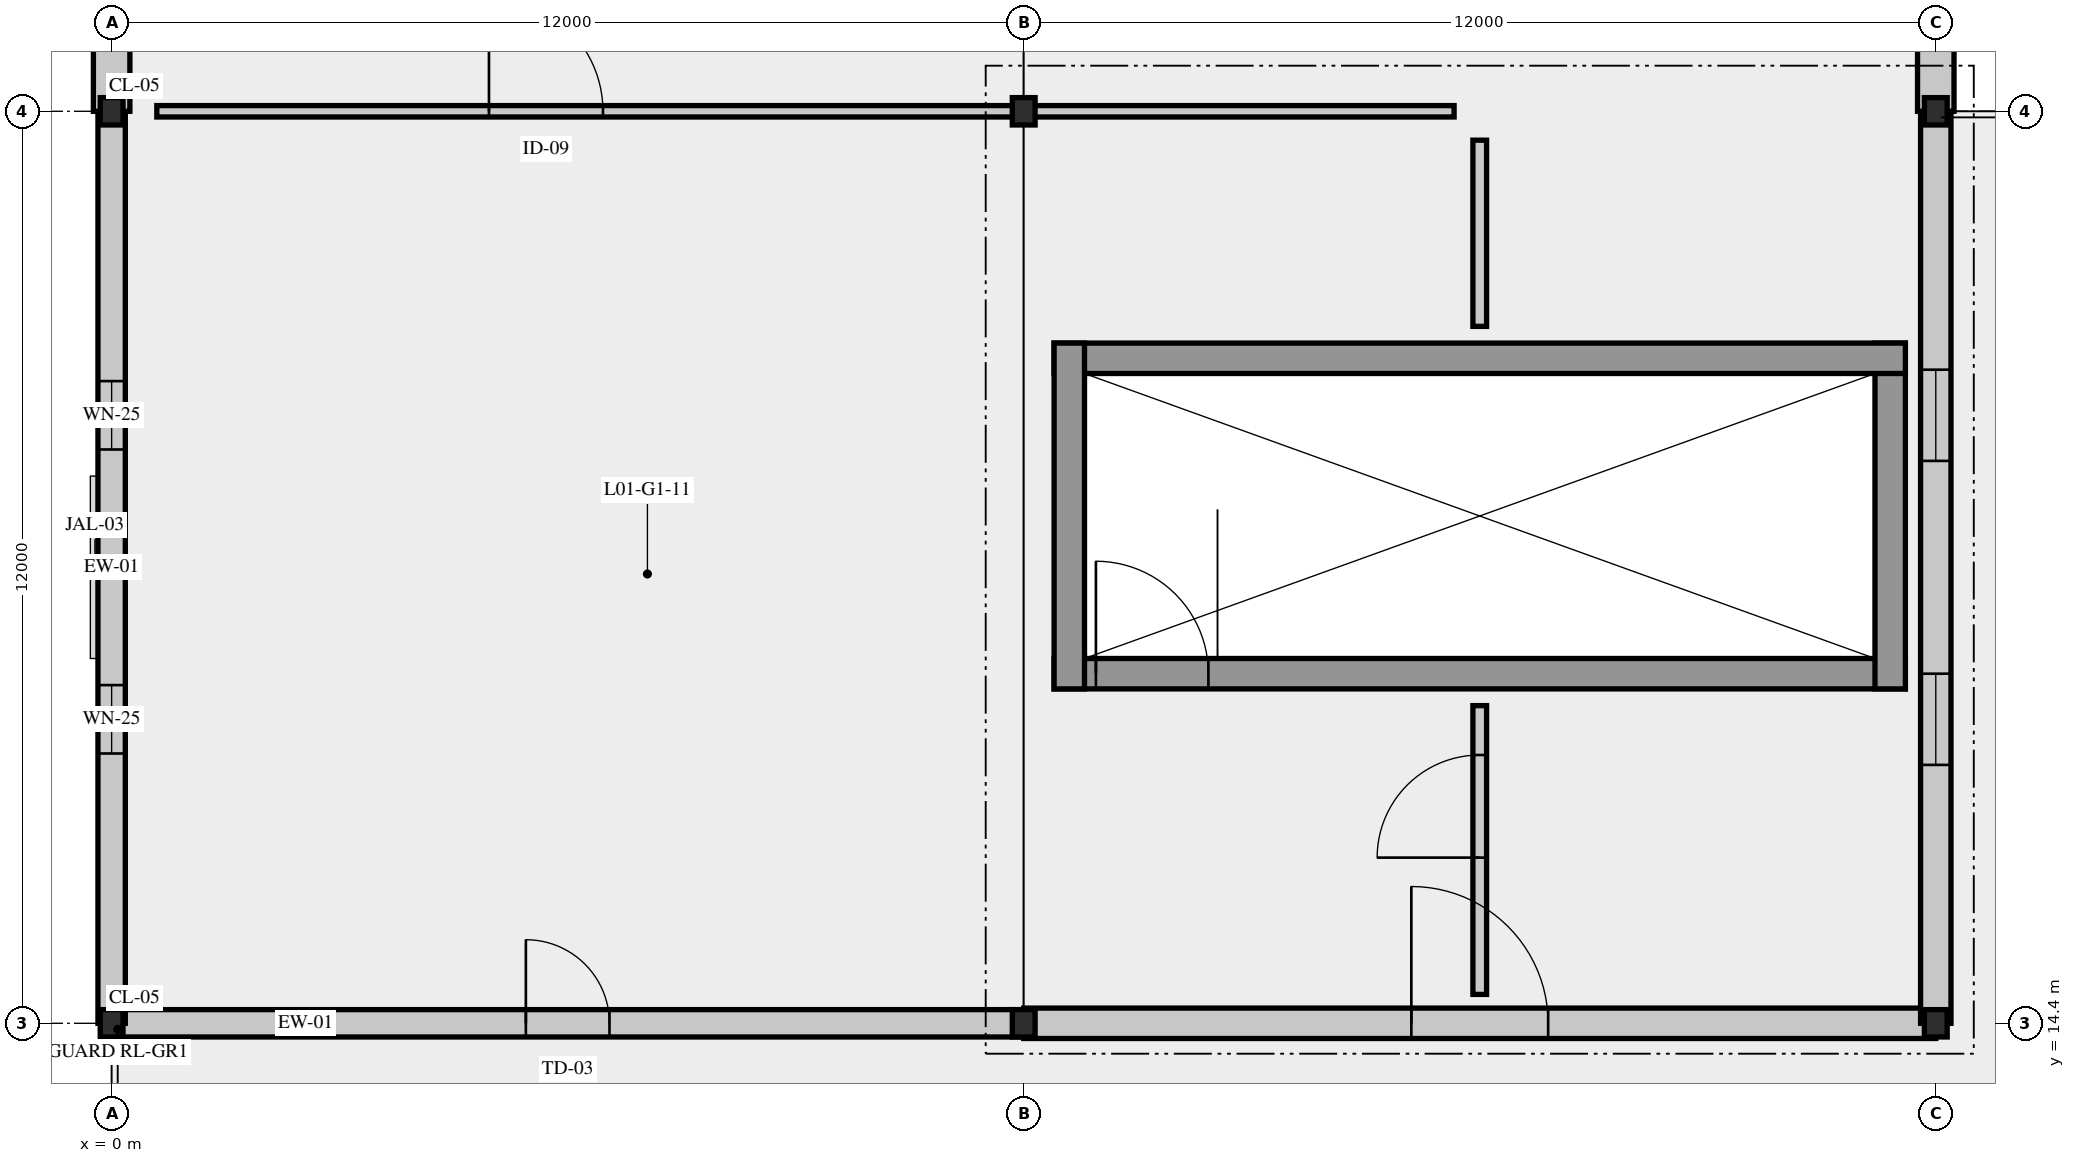
"""IFC4 building model, lengths in metres.
Left out: names, types, materials, properties, quantities, classifications, styles, units other than length and angle.
Written with IfcOpenShell. Run it as: python <this file> out.ifc"""

import sys

from ifc_helpers import new_model, si_unit, direction, frame, frame_2d, origin, origin_2d, place, context, subcontext, project, spatial, rectangle, i_section, extrude, element, fill, save


model = new_model("IFC4")
c1 = context("Model", 3, precision=1e-05, world=origin(), true_north=direction((0.0, 1.0)))
c2 = subcontext(c1, "Body", "Model", "MODEL_VIEW")
j1 = project(units=[si_unit("LENGTHUNIT", "METRE"), si_unit("PLANEANGLEUNIT", "RADIAN")], contexts=[c1])
p1 = place(None, origin())
s1 = spatial("IfcSite", under=j1, at=p1, CompositionType="ELEMENT")
p2 = place(p1, origin())
s2 = spatial("IfcBuilding", under=s1, at=p2, CompositionType="ELEMENT")
p3 = place(p2, frame((0.0, 0.0, 5.4)))
s3 = spatial("IfcBuildingStorey", under=s2, at=p3, CompositionType="ELEMENT", Elevation=5.4)
for number, where, z_axis, x_axis in (
    (1, (0.0, 14.4, 0.0), (0.0, 0.0, 1.0), (1.0, 0.0, 0.0)),
    (2, (0.0, 26.4, 0.0), (0.0, 0.0, 1.0), (1.0, 0.0, 0.0)),
    (3, (12.0, 14.4, 0.0), (0.0, 0.0, 1.0), (1.0, 0.0, 0.0)),
    (4, (12.0, 26.4, 0.0), (0.0, 0.0, 1.0), (1.0, 0.0, 0.0)),
    (5, (24.0, 14.4, 0.0), (0.0, 0.0, 1.0), (1.0, 0.0, 0.0)),
    (6, (24.0, 26.4, 0.0), (0.0, 0.0, 1.0), (1.0, 0.0, 0.0)),
):
    element("IfcColumn", number, at=place(p3, frame(where, z_axis=z_axis, x_axis=x_axis)), inside=s3, PredefinedType="COLUMN", context=c2, shape_type="SweptSolid", body=[
        extrude(i_section(OverallWidth=0.3, OverallDepth=0.36, WebThickness=0.012, FlangeThickness=0.022, FilletRadius=0.027, at=origin_2d()), origin(), (0.0, 0.0, 1.0), 5.4),
    ])
p4 = place(p3, frame((0.0, 14.4, 0.0), z_axis=(0.0, 0.0, 1.0), x_axis=(1.0, 0.0, 0.0)))
e7 = element("IfcWall", 7, at=p4, inside=s3, PredefinedType="SOLIDWALL", context=c2, shape_type="SweptSolid", body=[
    extrude(rectangle(XDim=12.0, YDim=0.36, at=frame_2d((6.0, 0.0))), origin(), (0.0, 0.0, 1.0), 4.48),
])
p5 = place(p4, frame((5.45, 0.0, 0.0)))
e8 = element("IfcOpeningElement", 8, at=p5, cuts=e7, PredefinedType="OPENING", context=c2, shape_type="SweptSolid", body=[
    extrude(rectangle(XDim=1.1, YDim=2.2, at=frame_2d((0.55, 1.1))), frame((0.0, 0.19, 0.0), z_axis=(0.0, -1.0, 0.0), x_axis=(1.0, 0.0, 0.0)), (0.0, 0.0, 1.0), 0.38),
])
p6 = place(p3, frame((0.0, 26.4, 0.0), z_axis=(0.0, 0.0, 1.0), x_axis=(0.0, -1.0, 0.0)))
e9 = element("IfcWall", 9, at=p6, inside=s3, PredefinedType="SOLIDWALL", context=c2, shape_type="SweptSolid", body=[
    extrude(rectangle(XDim=12.0, YDim=0.36, at=frame_2d((6.0, 0.0))), origin(), (0.0, 0.0, 1.0), 4.48),
])
p7 = place(p6, frame((3.55, 0.0, 0.95)))
e10 = element("IfcOpeningElement", 10, at=p7, cuts=e9, PredefinedType="OPENING", context=c2, shape_type="SweptSolid", body=[
    extrude(rectangle(XDim=0.9, YDim=2.1, at=frame_2d((0.45, 1.05))), frame((0.0, 0.19, 0.0), z_axis=(0.0, -1.0, 0.0), x_axis=(1.0, 0.0, 0.0)), (0.0, 0.0, 1.0), 0.38),
])
p8 = place(p6, frame((7.55, 0.0, 0.95)))
e11 = element("IfcOpeningElement", 11, at=p8, cuts=e9, PredefinedType="OPENING", context=c2, shape_type="SweptSolid", body=[
    extrude(rectangle(XDim=0.9, YDim=2.1, at=frame_2d((0.45, 1.05))), frame((0.0, 0.19, 0.0), z_axis=(0.0, -1.0, 0.0), x_axis=(1.0, 0.0, 0.0)), (0.0, 0.0, 1.0), 0.38),
])
p9 = place(p3, frame((0.0, 38.4, 0.0), z_axis=(0.0, 0.0, 1.0), x_axis=(0.0, -1.0, 0.0)))
e12 = element("IfcWall", 12, at=p9, inside=s3, PredefinedType="SOLIDWALL", context=c2, shape_type="SweptSolid", body=[
    extrude(rectangle(XDim=12.0, YDim=0.48, at=frame_2d((6.0, 0.0))), origin(), (0.0, 0.0, 1.0), 4.18),
])
p10 = place(p3, frame((12.0, 14.4, 0.0), z_axis=(0.0, 0.0, 1.0), x_axis=(1.0, 0.0, 0.0)))
e13 = element("IfcWall", 13, at=p10, inside=s3, PredefinedType="SOLIDWALL", context=c2, shape_type="SweptSolid", body=[
    extrude(rectangle(XDim=12.0, YDim=0.4, at=frame_2d((6.0, 0.0))), origin(), (0.0, 0.0, 1.0), 4.48),
])
p11 = place(p10, frame((5.1, 0.0, 0.0)))
e14 = element("IfcOpeningElement", 14, at=p11, cuts=e13, PredefinedType="OPENING", context=c2, shape_type="SweptSolid", body=[
    extrude(rectangle(XDim=1.8, YDim=2.3, at=frame_2d((0.9, 1.15))), frame((0.0, 0.21, 0.0), z_axis=(0.0, -1.0, 0.0), x_axis=(1.0, 0.0, 0.0)), (0.0, 0.0, 1.0), 0.42),
])
p12 = place(p3, frame((24.0, 14.4, 0.0), z_axis=(0.0, 0.0, 1.0), x_axis=(0.0, 1.0, 0.0)))
e15 = element("IfcWall", 15, at=p12, inside=s3, PredefinedType="SOLIDWALL", context=c2, shape_type="SweptSolid", body=[
    extrude(rectangle(XDim=12.0, YDim=0.4, at=frame_2d((6.0, 0.0))), origin(), (0.0, 0.0, 1.0), 4.48),
])
p13 = place(p12, frame((3.4, 0.0, 0.95)))
e16 = element("IfcOpeningElement", 16, at=p13, cuts=e15, PredefinedType="OPENING", context=c2, shape_type="SweptSolid", body=[
    extrude(rectangle(XDim=1.2, YDim=2.1, at=frame_2d((0.6, 1.05))), frame((0.0, 0.21, 0.0), z_axis=(0.0, -1.0, 0.0), x_axis=(1.0, 0.0, 0.0)), (0.0, 0.0, 1.0), 0.42),
])
p14 = place(p12, frame((7.4, 0.0, 0.95)))
e17 = element("IfcOpeningElement", 17, at=p14, cuts=e15, PredefinedType="OPENING", context=c2, shape_type="SweptSolid", body=[
    extrude(rectangle(XDim=1.2, YDim=2.1, at=frame_2d((0.6, 1.05))), frame((0.0, 0.21, 0.0), z_axis=(0.0, -1.0, 0.0), x_axis=(1.0, 0.0, 0.0)), (0.0, 0.0, 1.0), 0.42),
])
p15 = place(p3, frame((24.0, 26.4, 0.0), z_axis=(0.0, 0.0, 1.0), x_axis=(0.0, 1.0, 0.0)))
e18 = element("IfcWall", 18, at=p15, inside=s3, PredefinedType="SOLIDWALL", context=c2, shape_type="SweptSolid", body=[
    extrude(rectangle(XDim=12.0, YDim=0.48, at=frame_2d((6.0, 0.0))), origin(), (0.0, 0.0, 1.0), 4.18),
])
p16 = place(p3, frame((12.4, 19.0, 0.0), z_axis=(0.0, 0.0, 1.0), x_axis=(1.0, 0.0, 0.0)))
e19 = element("IfcWall", 19, at=p16, inside=s3, PredefinedType="SHEAR", context=c2, shape_type="SweptSolid", body=[
    extrude(rectangle(XDim=11.2, YDim=0.4, at=frame_2d((5.6, 0.0))), origin(), (0.0, 0.0, 1.0), 5.11),
])
p17 = place(p16, frame((0.55, 0.0, 0.0)))
e20 = element("IfcOpeningElement", 20, at=p17, cuts=e19, PredefinedType="OPENING", context=c2, shape_type="SweptSolid", body=[
    extrude(rectangle(XDim=1.48, YDim=2.3, at=frame_2d((0.74, 1.15))), frame((0.0, 0.21, 0.0), z_axis=(0.0, -1.0, 0.0), x_axis=(1.0, 0.0, 0.0)), (0.0, 0.0, 1.0), 0.42),
])
p18 = place(p3, frame((23.4, 18.8, 0.0), z_axis=(0.0, 0.0, 1.0), x_axis=(0.0, 1.0, 0.0)))
e21 = element("IfcWall", 21, at=p18, inside=s3, PredefinedType="SHEAR", context=c2, shape_type="SweptSolid", body=[
    extrude(rectangle(XDim=4.55, YDim=0.4, at=frame_2d((2.275, 0.0))), origin(), (0.0, 0.0, 1.0), 5.11),
])
p19 = place(p3, frame((23.6, 23.15, 0.0), z_axis=(0.0, 0.0, 1.0), x_axis=(-1.0, 0.0, 0.0)))
e22 = element("IfcWall", 22, at=p19, inside=s3, PredefinedType="SHEAR", context=c2, shape_type="SweptSolid", body=[
    extrude(rectangle(XDim=11.2, YDim=0.4, at=frame_2d((5.6, 0.0))), origin(), (0.0, 0.0, 1.0), 5.11),
])
p20 = place(p3, frame((12.6, 23.35, 0.0), z_axis=(0.0, 0.0, 1.0), x_axis=(0.0, -1.0, 0.0)))
e23 = element("IfcWall", 23, at=p20, inside=s3, PredefinedType="SHEAR", context=c2, shape_type="SweptSolid", body=[
    extrude(rectangle(XDim=4.55, YDim=0.4, at=frame_2d((2.275, 0.0))), origin(), (0.0, 0.0, 1.0), 5.11),
])
p21 = place(p3, frame((18.0, 14.78, 0.0), z_axis=(0.0, 0.0, 1.0), x_axis=(0.0, 1.0, 0.0)))
e24 = element("IfcWall", 24, at=p21, inside=s3, PredefinedType="PARTITIONING", context=c2, shape_type="SweptSolid", body=[
    extrude(rectangle(XDim=3.8, YDim=0.18, at=frame_2d((1.9, 0.0))), origin(), (0.0, 0.0, 1.0), 5.09),
])
p22 = place(p21, frame((1.8, 0.0, 0.0)))
e25 = element("IfcOpeningElement", 25, at=p22, cuts=e24, PredefinedType="OPENING", context=c2, shape_type="SweptSolid", body=[
    extrude(rectangle(XDim=1.35, YDim=2.3, at=frame_2d((0.675, 1.15))), frame((0.0, 0.1, 0.0), z_axis=(0.0, -1.0, 0.0), x_axis=(1.0, 0.0, 0.0)), (0.0, 0.0, 1.0), 0.2),
])
p23 = place(p3, frame((18.0, 23.57, 0.0), z_axis=(0.0, 0.0, 1.0), x_axis=(0.0, 1.0, 0.0)))
e26 = element("IfcWall", 26, at=p23, inside=s3, PredefinedType="PARTITIONING", context=c2, shape_type="SweptSolid", body=[
    extrude(rectangle(XDim=2.45, YDim=0.18, at=frame_2d((1.225, 0.0))), origin(), (0.0, 0.0, 1.0), 5.09),
])
p24 = place(p3, frame((0.594, 26.4, 0.0), z_axis=(0.0, 0.0, 1.0), x_axis=(1.0, 0.0, 0.0)))
e27 = element("IfcWall", 27, at=p24, inside=s3, PredefinedType="PARTITIONING", context=c2, shape_type="SweptSolid", body=[
    extrude(rectangle(XDim=17.068, YDim=0.15, at=frame_2d((8.534, 0.0))), origin(), (0.0, 0.0, 1.0), 4.49),
])
p25 = place(p24, frame((4.37, 0.0, 0.0)))
e28 = element("IfcOpeningElement", 28, at=p25, cuts=e27, PredefinedType="OPENING", context=c2, shape_type="SweptSolid", body=[
    extrude(rectangle(XDim=1.5, YDim=2.35, at=frame_2d((0.75, 1.175))), frame((0.0, 0.085, 0.0), z_axis=(0.0, -1.0, 0.0), x_axis=(1.0, 0.0, 0.0)), (0.0, 0.0, 1.0), 0.17),
])
p26 = place(p5, origin())
e29 = element("IfcDoor", 29, at=p26, inside=s3, OperationType="SINGLE_SWING_LEFT", PredefinedType="DOOR", context=c2, shape_type="SweptSolid", body=[
    extrude(rectangle(XDim=1.1, YDim=2.2, at=frame_2d((0.55, 1.1))), frame((0.0, 0.025, 0.0), z_axis=(0.0, -1.0, 0.0), x_axis=(1.0, 0.0, 0.0)), (0.0, 0.0, 1.0), 0.05),
])
fill(e8, e29)
p27 = place(p7, origin())
e30 = element("IfcWindow", 30, at=p27, inside=s3, PartitioningType="SINGLE_PANEL", PredefinedType="WINDOW", context=c2, shape_type="SweptSolid", body=[
    extrude(rectangle(XDim=0.9, YDim=2.1, at=frame_2d((0.45, 1.05))), frame((0.0, 0.03, 0.0), z_axis=(0.0, -1.0, 0.0), x_axis=(1.0, 0.0, 0.0)), (0.0, 0.0, 1.0), 0.06),
])
fill(e10, e30)
p28 = place(p8, origin())
e31 = element("IfcWindow", 31, at=p28, inside=s3, PartitioningType="SINGLE_PANEL", PredefinedType="WINDOW", context=c2, shape_type="SweptSolid", body=[
    extrude(rectangle(XDim=0.9, YDim=2.1, at=frame_2d((0.45, 1.05))), frame((0.0, 0.03, 0.0), z_axis=(0.0, -1.0, 0.0), x_axis=(1.0, 0.0, 0.0)), (0.0, 0.0, 1.0), 0.06),
])
fill(e11, e31)
p29 = place(p11, origin())
e32 = element("IfcDoor", 32, at=p29, inside=s3, OperationType="DOUBLE_DOOR_SINGLE_SWING", PredefinedType="DOOR", context=c2, shape_type="SweptSolid", body=[
    extrude(rectangle(XDim=1.8, YDim=2.3, at=frame_2d((0.9, 1.15))), frame((0.0, 0.025, 0.0), z_axis=(0.0, -1.0, 0.0), x_axis=(1.0, 0.0, 0.0)), (0.0, 0.0, 1.0), 0.05),
])
fill(e14, e32)
p30 = place(p13, origin())
e33 = element("IfcWindow", 33, at=p30, inside=s3, PartitioningType="SINGLE_PANEL", PredefinedType="WINDOW", context=c2, shape_type="SweptSolid", body=[
    extrude(rectangle(XDim=1.2, YDim=2.1, at=frame_2d((0.6, 1.05))), frame((0.0, 0.03, 0.0), z_axis=(0.0, -1.0, 0.0), x_axis=(1.0, 0.0, 0.0)), (0.0, 0.0, 1.0), 0.06),
])
fill(e16, e33)
p31 = place(p14, origin())
e34 = element("IfcWindow", 34, at=p31, inside=s3, PartitioningType="SINGLE_PANEL", PredefinedType="WINDOW", context=c2, shape_type="SweptSolid", body=[
    extrude(rectangle(XDim=1.2, YDim=2.1, at=frame_2d((0.6, 1.05))), frame((0.0, 0.03, 0.0), z_axis=(0.0, -1.0, 0.0), x_axis=(1.0, 0.0, 0.0)), (0.0, 0.0, 1.0), 0.06),
])
fill(e17, e34)
p32 = place(p17, origin())
e35 = element("IfcDoor", 35, at=p32, inside=s3, OperationType="DOUBLE_DOOR_SINGLE_SWING", PredefinedType="DOOR", context=c2, shape_type="SweptSolid", body=[
    extrude(rectangle(XDim=1.48, YDim=2.3, at=frame_2d((0.74, 1.15))), frame((0.0, 0.025, 0.0), z_axis=(0.0, -1.0, 0.0), x_axis=(1.0, 0.0, 0.0)), (0.0, 0.0, 1.0), 0.05),
])
fill(e20, e35)
p33 = place(p22, origin())
e36 = element("IfcDoor", 36, at=p33, inside=s3, OperationType="DOUBLE_SWING_LEFT", PredefinedType="DOOR", context=c2, shape_type="SweptSolid", body=[
    extrude(rectangle(XDim=1.35, YDim=2.3, at=frame_2d((0.675, 1.15))), frame((0.0, 0.025, 0.0), z_axis=(0.0, -1.0, 0.0), x_axis=(1.0, 0.0, 0.0)), (0.0, 0.0, 1.0), 0.05),
])
fill(e25, e36)
p34 = place(p25, origin())
e37 = element("IfcDoor", 37, at=p34, inside=s3, OperationType="DOUBLE_DOOR_SINGLE_SWING", PredefinedType="DOOR", context=c2, shape_type="SweptSolid", body=[
    extrude(rectangle(XDim=1.5, YDim=2.35, at=frame_2d((0.75, 1.175))), frame((0.0, 0.025, 0.0), z_axis=(0.0, -1.0, 0.0), x_axis=(1.0, 0.0, 0.0)), (0.0, 0.0, 1.0), 0.05),
])
fill(e28, e37)
save(model, sys.argv[1])
